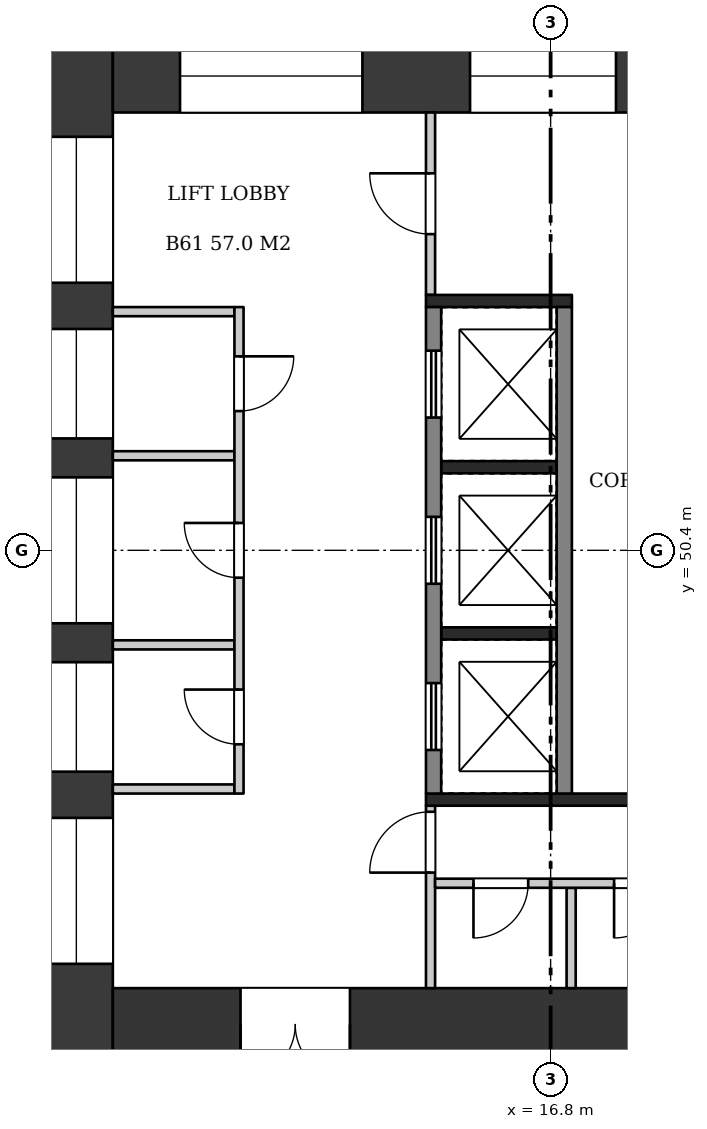
"""IFC4 building model, lengths in metres.
Left out: names, types, materials, properties, quantities, classifications, styles, units other than length and angle.
Written with IfcOpenShell. Run it as: python <this file> out.ifc"""

import sys

from ifc_helpers import new_model, si_unit, direction, frame, frame_2d, origin, place, context, subcontext, project, spatial, rectangle, extrude, element, fill, save


model = new_model("IFC4")
c1 = context("Model", 3, precision=1e-05, world=origin(), true_north=direction((0.0, 1.0)))
c2 = subcontext(c1, "Body", "Model", "MODEL_VIEW")
j1 = project(units=[si_unit("LENGTHUNIT", "METRE"), si_unit("PLANEANGLEUNIT", "RADIAN")], contexts=[c1])
p1 = place(None, origin())
s1 = spatial("IfcSite", under=j1, at=p1, CompositionType="ELEMENT")
p2 = place(p1, origin())
s2 = spatial("IfcBuilding", under=s1, at=p2, CompositionType="ELEMENT")
p3 = place(p2, frame((0.0, 0.0, 235.2)))
s3 = spatial("IfcBuildingStorey", under=s2, at=p3, CompositionType="ELEMENT", Elevation=235.2)
p4 = place(p3, frame((9.0, 58.8, 0.0), z_axis=(0.0, 0.0, 1.0), x_axis=(0.0, -1.0, 0.0)))
e1 = element("IfcWall", 1, at=p4, inside=s3, PredefinedType="SHEAR", context=c2, shape_type="SweptSolid", body=[
    extrude(rectangle(XDim=16.8, YDim=1.2, at=frame_2d((8.4, 0.0))), origin(), (0.0, 0.0, 1.0), 3.22),
])
p5 = place(p4, frame((1.6, 0.0, 0.6)))
e2 = element("IfcOpeningElement", 2, at=p5, cuts=e1, PredefinedType="OPENING", context=c2, shape_type="SweptSolid", body=[
    extrude(rectangle(XDim=2.4, YDim=2.1, at=frame_2d((1.2, 1.05))), frame((0.0, 0.61, 0.0), z_axis=(0.0, -1.0, 0.0), x_axis=(1.0, 0.0, 0.0)), (0.0, 0.0, 1.0), 1.22),
])
p6 = place(p4, frame((4.76, 0.0, 1.6)))
e3 = element("IfcOpeningElement", 3, at=p6, cuts=e1, PredefinedType="OPENING", context=c2, shape_type="SweptSolid", body=[
    extrude(rectangle(XDim=1.8, YDim=1.2, at=frame_2d((0.9, 0.6))), frame((0.0, 0.61, 0.0), z_axis=(0.0, -1.0, 0.0), x_axis=(1.0, 0.0, 0.0)), (0.0, 0.0, 1.0), 1.22),
])
p7 = place(p4, frame((7.2, 0.0, 1.6)))
e4 = element("IfcOpeningElement", 4, at=p7, cuts=e1, PredefinedType="OPENING", context=c2, shape_type="SweptSolid", body=[
    extrude(rectangle(XDim=2.4, YDim=1.2, at=frame_2d((1.2, 0.6))), frame((0.0, 0.61, 0.0), z_axis=(0.0, -1.0, 0.0), x_axis=(1.0, 0.0, 0.0)), (0.0, 0.0, 1.0), 1.22),
])
p8 = place(p4, frame((10.24, 0.0, 1.6)))
e5 = element("IfcOpeningElement", 5, at=p8, cuts=e1, PredefinedType="OPENING", context=c2, shape_type="SweptSolid", body=[
    extrude(rectangle(XDim=1.8, YDim=1.2, at=frame_2d((0.9, 0.6))), frame((0.0, 0.61, 0.0), z_axis=(0.0, -1.0, 0.0), x_axis=(1.0, 0.0, 0.0)), (0.0, 0.0, 1.0), 1.22),
])
p9 = place(p4, frame((12.8, 0.0, 0.6)))
e6 = element("IfcOpeningElement", 6, at=p9, cuts=e1, PredefinedType="OPENING", context=c2, shape_type="SweptSolid", body=[
    extrude(rectangle(XDim=2.4, YDim=2.1, at=frame_2d((1.2, 1.05))), frame((0.0, 0.61, 0.0), z_axis=(0.0, -1.0, 0.0), x_axis=(1.0, 0.0, 0.0)), (0.0, 0.0, 1.0), 1.22),
])
p10 = place(p3, frame((9.6, 58.2, 0.0), z_axis=(0.0, 0.0, 1.0), x_axis=(1.0, 0.0, 0.0)))
e7 = element("IfcWall", 7, at=p10, inside=s3, PredefinedType="SHEAR", context=c2, shape_type="SweptSolid", body=[
    extrude(rectangle(XDim=14.4, YDim=1.2, at=frame_2d((7.2, 0.0))), origin(), (0.0, 0.0, 1.0), 3.22),
])
p11 = place(p10, frame((1.105, 0.0, 0.6)))
e8 = element("IfcOpeningElement", 8, at=p11, cuts=e7, PredefinedType="OPENING", context=c2, shape_type="SweptSolid", body=[
    extrude(rectangle(XDim=3.0, YDim=2.1, at=frame_2d((1.5, 1.05))), frame((0.0, 0.61, 0.0), z_axis=(0.0, -1.0, 0.0), x_axis=(1.0, 0.0, 0.0)), (0.0, 0.0, 1.0), 1.22),
])
p12 = place(p10, frame((5.875, 0.0, 0.6)))
e9 = element("IfcOpeningElement", 9, at=p12, cuts=e7, PredefinedType="OPENING", context=c2, shape_type="SweptSolid", body=[
    extrude(rectangle(XDim=2.4, YDim=2.1, at=frame_2d((1.2, 1.05))), frame((0.0, 0.61, 0.0), z_axis=(0.0, -1.0, 0.0), x_axis=(1.0, 0.0, 0.0)), (0.0, 0.0, 1.0), 1.22),
])
p13 = place(p10, frame((9.993, 0.0, 0.5)))
e10 = element("IfcOpeningElement", 10, at=p13, cuts=e7, PredefinedType="OPENING", context=c2, shape_type="SweptSolid", body=[
    extrude(rectangle(XDim=1.2, YDim=2.4, at=frame_2d((0.6, 1.2))), frame((0.0, 0.61, 0.0), z_axis=(0.0, -1.0, 0.0), x_axis=(1.0, 0.0, 0.0)), (0.0, 0.0, 1.0), 1.22),
])
p14 = place(p10, frame((12.197, 0.0, 0.5)))
e11 = element("IfcOpeningElement", 11, at=p14, cuts=e7, PredefinedType="OPENING", context=c2, shape_type="SweptSolid", body=[
    extrude(rectangle(XDim=1.2, YDim=2.4, at=frame_2d((0.6, 1.2))), frame((0.0, 0.61, 0.0), z_axis=(0.0, -1.0, 0.0), x_axis=(1.0, 0.0, 0.0)), (0.0, 0.0, 1.0), 1.22),
])
p15 = place(p3, frame((9.6, 42.6, 0.0), z_axis=(0.0, 0.0, 1.0), x_axis=(1.0, 0.0, 0.0)))
e12 = element("IfcWall", 12, at=p15, inside=s3, PredefinedType="SHEAR", context=c2, shape_type="SweptSolid", body=[
    extrude(rectangle(XDim=14.4, YDim=1.2, at=frame_2d((7.2, 0.0))), origin(), (0.0, 0.0, 1.0), 3.22),
])
p16 = place(p15, frame((2.1, 0.0, 0.0)))
e13 = element("IfcOpeningElement", 13, at=p16, cuts=e12, PredefinedType="OPENING", context=c2, shape_type="SweptSolid", body=[
    extrude(rectangle(XDim=1.8, YDim=2.1, at=frame_2d((0.9, 1.05))), frame((0.0, 0.61, 0.0), z_axis=(0.0, -1.0, 0.0), x_axis=(1.0, 0.0, 0.0)), (0.0, 0.0, 1.0), 1.22),
])
for number, where, z_axis, x_axis in (
    (14, (9.6, 54.325, 0.0), (0.0, 0.0, 1.0), (1.0, 0.0, 0.0)),
    (15, (9.6, 46.475, 0.0), (0.0, 0.0, 1.0), (1.0, 0.0, 0.0)),
    (16, (9.6, 51.955, 0.0), (0.0, 0.0, 1.0), (1.0, 0.0, 0.0)),
    (17, (9.6, 48.845, 0.0), (0.0, 0.0, 1.0), (1.0, 0.0, 0.0)),
):
    element("IfcWall", number, at=place(p3, frame(where, z_axis=z_axis, x_axis=x_axis)), inside=s3, PredefinedType="PARTITIONING", context=c2, shape_type="SweptSolid", body=[
        extrude(rectangle(XDim=2.0, YDim=0.15, at=frame_2d((1.0, 0.0))), origin(), (0.0, 0.0, 1.0), 3.22),
    ])
p17 = place(p3, frame((11.675, 54.4, 0.0), z_axis=(0.0, 0.0, 1.0), x_axis=(0.0, -1.0, 0.0)))
e18 = element("IfcWall", 18, at=p17, inside=s3, PredefinedType="PARTITIONING", context=c2, shape_type="SweptSolid", body=[
    extrude(rectangle(XDim=8.0, YDim=0.15, at=frame_2d((4.0, 0.0))), origin(), (0.0, 0.0, 1.0), 3.22),
])
p18 = place(p17, frame((0.81, 0.0, 0.0)))
e19 = element("IfcOpeningElement", 19, at=p18, cuts=e18, PredefinedType="OPENING", context=c2, shape_type="SweptSolid", body=[
    extrude(rectangle(XDim=0.9, YDim=2.1, at=frame_2d((0.45, 1.05))), frame((0.0, 0.085, 0.0), z_axis=(0.0, -1.0, 0.0), x_axis=(1.0, 0.0, 0.0)), (0.0, 0.0, 1.0), 0.17),
])
p19 = place(p17, frame((3.55, 0.0, 0.0)))
e20 = element("IfcOpeningElement", 20, at=p19, cuts=e18, PredefinedType="OPENING", context=c2, shape_type="SweptSolid", body=[
    extrude(rectangle(XDim=0.9, YDim=2.1, at=frame_2d((0.45, 1.05))), frame((0.0, 0.085, 0.0), z_axis=(0.0, -1.0, 0.0), x_axis=(1.0, 0.0, 0.0)), (0.0, 0.0, 1.0), 0.17),
])
p20 = place(p17, frame((6.29, 0.0, 0.0)))
e21 = element("IfcOpeningElement", 21, at=p20, cuts=e18, PredefinedType="OPENING", context=c2, shape_type="SweptSolid", body=[
    extrude(rectangle(XDim=0.9, YDim=2.1, at=frame_2d((0.45, 1.05))), frame((0.0, 0.085, 0.0), z_axis=(0.0, -1.0, 0.0), x_axis=(1.0, 0.0, 0.0)), (0.0, 0.0, 1.0), 0.17),
])
for number, where, z_axis, x_axis in (
    (22, (15.0, 51.767, 0.0), (0.0, 0.0, 1.0), (1.0, 0.0, 0.0)),
    (23, (15.0, 49.033, 0.0), (0.0, 0.0, 1.0), (1.0, 0.0, 0.0)),
):
    element("IfcWall", number, at=place(p3, frame(where, z_axis=z_axis, x_axis=x_axis)), inside=s3, PredefinedType="SHEAR", context=c2, shape_type="SweptSolid", body=[
        extrude(rectangle(XDim=1.9, YDim=0.2, at=frame_2d((0.95, 0.0))), origin(), (0.0, 0.0, 1.0), 3.22),
    ])
p21 = place(p3, frame((14.875, 54.4, 0.0), z_axis=(0.0, 0.0, 1.0), x_axis=(0.0, -1.0, 0.0)))
e24 = element("IfcWall", 24, at=p21, inside=s3, PredefinedType="SHEAR", context=c2, shape_type="SweptSolid", body=[
    extrude(rectangle(XDim=8.0, YDim=0.25, at=frame_2d((4.0, 0.0))), origin(), (0.0, 0.0, 1.0), 3.22),
])
p22 = place(p21, frame((0.717, 0.0, 0.0)))
e25 = element("IfcOpeningElement", 25, at=p22, cuts=e24, PredefinedType="OPENING", context=c2, shape_type="SweptSolid", body=[
    extrude(rectangle(XDim=1.1, YDim=2.1, at=frame_2d((0.55, 1.05))), frame((0.0, 0.135, 0.0), z_axis=(0.0, -1.0, 0.0), x_axis=(1.0, 0.0, 0.0)), (0.0, 0.0, 1.0), 0.27),
])
p23 = place(p21, frame((3.45, 0.0, 0.0)))
e26 = element("IfcOpeningElement", 26, at=p23, cuts=e24, PredefinedType="OPENING", context=c2, shape_type="SweptSolid", body=[
    extrude(rectangle(XDim=1.1, YDim=2.1, at=frame_2d((0.55, 1.05))), frame((0.0, 0.135, 0.0), z_axis=(0.0, -1.0, 0.0), x_axis=(1.0, 0.0, 0.0)), (0.0, 0.0, 1.0), 0.27),
])
p24 = place(p21, frame((6.183, 0.0, 0.0)))
e27 = element("IfcOpeningElement", 27, at=p24, cuts=e24, PredefinedType="OPENING", context=c2, shape_type="SweptSolid", body=[
    extrude(rectangle(XDim=1.1, YDim=2.1, at=frame_2d((0.55, 1.05))), frame((0.0, 0.135, 0.0), z_axis=(0.0, -1.0, 0.0), x_axis=(1.0, 0.0, 0.0)), (0.0, 0.0, 1.0), 0.27),
])
p25 = place(p3, frame((17.025, 54.4, 0.0), z_axis=(0.0, 0.0, 1.0), x_axis=(0.0, -1.0, 0.0)))
e28 = element("IfcWall", 28, at=p25, inside=s3, PredefinedType="SHEAR", context=c2, shape_type="SweptSolid", body=[
    extrude(rectangle(XDim=8.0, YDim=0.25, at=frame_2d((4.0, 0.0))), origin(), (0.0, 0.0, 1.0), 3.22),
])
p26 = place(p3, frame((14.75, 54.5, 0.0), z_axis=(0.0, 0.0, 1.0), x_axis=(1.0, 0.0, 0.0)))
e29 = element("IfcWall", 29, at=p26, inside=s3, PredefinedType="SHEAR", context=c2, shape_type="SweptSolid", body=[
    extrude(rectangle(XDim=2.4, YDim=0.2, at=frame_2d((1.2, 0.0))), origin(), (0.0, 0.0, 1.0), 3.22),
])
p27 = place(p3, frame((14.825, 57.6, 0.0), z_axis=(0.0, 0.0, 1.0), x_axis=(0.0, -1.0, 0.0)))
e30 = element("IfcWall", 30, at=p27, inside=s3, PredefinedType="PARTITIONING", context=c2, shape_type="SweptSolid", body=[
    extrude(rectangle(XDim=3.0, YDim=0.15, at=frame_2d((1.5, 0.0))), origin(), (0.0, 0.0, 1.0), 3.22),
])
p28 = place(p27, frame((1.0, 0.0, 0.0)))
e31 = element("IfcOpeningElement", 31, at=p28, cuts=e30, PredefinedType="OPENING", context=c2, shape_type="SweptSolid", body=[
    extrude(rectangle(XDim=1.0, YDim=2.1, at=frame_2d((0.5, 1.05))), frame((0.0, 0.085, 0.0), z_axis=(0.0, -1.0, 0.0), x_axis=(1.0, 0.0, 0.0)), (0.0, 0.0, 1.0), 0.17),
])
p29 = place(p3, frame((14.75, 46.3, 0.0), z_axis=(0.0, 0.0, 1.0), x_axis=(1.0, 0.0, 0.0)))
e32 = element("IfcWall", 32, at=p29, inside=s3, PredefinedType="SHEAR", context=c2, shape_type="SweptSolid", body=[
    extrude(rectangle(XDim=9.25, YDim=0.2, at=frame_2d((4.625, 0.0))), origin(), (0.0, 0.0, 1.0), 3.22),
])
p30 = place(p3, frame((14.825, 46.2, 0.0), z_axis=(0.0, 0.0, 1.0), x_axis=(0.0, -1.0, 0.0)))
e33 = element("IfcWall", 33, at=p30, inside=s3, PredefinedType="PARTITIONING", context=c2, shape_type="SweptSolid", body=[
    extrude(rectangle(XDim=3.0, YDim=0.15, at=frame_2d((1.5, 0.0))), origin(), (0.0, 0.0, 1.0), 3.22),
])
p31 = place(p30, frame((0.1, 0.0, 0.0)))
e34 = element("IfcOpeningElement", 34, at=p31, cuts=e33, PredefinedType="OPENING", context=c2, shape_type="SweptSolid", body=[
    extrude(rectangle(XDim=1.0, YDim=2.1, at=frame_2d((0.5, 1.05))), frame((0.0, 0.085, 0.0), z_axis=(0.0, -1.0, 0.0), x_axis=(1.0, 0.0, 0.0)), (0.0, 0.0, 1.0), 0.17),
])
p32 = place(p3, frame((17.137, 44.85, 0.0), z_axis=(0.0, 0.0, 1.0), x_axis=(0.0, -1.0, 0.0)))
e35 = element("IfcWall", 35, at=p32, inside=s3, PredefinedType="PARTITIONING", context=c2, shape_type="SweptSolid", body=[
    extrude(rectangle(XDim=1.65, YDim=0.15, at=frame_2d((0.825, 0.0))), origin(), (0.0, 0.0, 1.0), 3.22),
])
p33 = place(p3, frame((14.9, 44.925, 0.0), z_axis=(0.0, 0.0, 1.0), x_axis=(1.0, 0.0, 0.0)))
e36 = element("IfcWall", 36, at=p33, inside=s3, PredefinedType="PARTITIONING", context=c2, shape_type="SweptSolid", body=[
    extrude(rectangle(XDim=9.1, YDim=0.15, at=frame_2d((4.55, 0.0))), origin(), (0.0, 0.0, 1.0), 3.22),
])
p34 = place(p33, frame((0.631, 0.0, 0.0)))
e37 = element("IfcOpeningElement", 37, at=p34, cuts=e36, PredefinedType="OPENING", context=c2, shape_type="SweptSolid", body=[
    extrude(rectangle(XDim=0.9, YDim=2.1, at=frame_2d((0.45, 1.05))), frame((0.0, 0.085, 0.0), z_axis=(0.0, -1.0, 0.0), x_axis=(1.0, 0.0, 0.0)), (0.0, 0.0, 1.0), 0.17),
])
p35 = place(p33, frame((2.944, 0.0, 0.0)))
e38 = element("IfcOpeningElement", 38, at=p35, cuts=e36, PredefinedType="OPENING", context=c2, shape_type="SweptSolid", body=[
    extrude(rectangle(XDim=0.9, YDim=2.1, at=frame_2d((0.45, 1.05))), frame((0.0, 0.085, 0.0), z_axis=(0.0, -1.0, 0.0), x_axis=(1.0, 0.0, 0.0)), (0.0, 0.0, 1.0), 0.17),
])
p36 = place(p33, frame((5.256, 0.0, 0.0)))
e39 = element("IfcOpeningElement", 39, at=p36, cuts=e36, PredefinedType="OPENING", context=c2, shape_type="SweptSolid", body=[
    extrude(rectangle(XDim=0.9, YDim=2.1, at=frame_2d((0.45, 1.05))), frame((0.0, 0.085, 0.0), z_axis=(0.0, -1.0, 0.0), x_axis=(1.0, 0.0, 0.0)), (0.0, 0.0, 1.0), 0.17),
])
p37 = place(p33, frame((7.569, 0.0, 0.0)))
e40 = element("IfcOpeningElement", 40, at=p37, cuts=e36, PredefinedType="OPENING", context=c2, shape_type="SweptSolid", body=[
    extrude(rectangle(XDim=0.9, YDim=2.1, at=frame_2d((0.45, 1.05))), frame((0.0, 0.085, 0.0), z_axis=(0.0, -1.0, 0.0), x_axis=(1.0, 0.0, 0.0)), (0.0, 0.0, 1.0), 0.17),
])
p38 = place(p16, frame((1.8, 0.0, 0.0), z_axis=(0.0, 0.0, 1.0), x_axis=(-1.0, 0.0, 0.0)))
e41 = element("IfcDoor", 41, at=p38, inside=s3, OperationType="DOUBLE_DOOR_SINGLE_SWING", PredefinedType="DOOR", context=c2, shape_type="SweptSolid", body=[
    extrude(rectangle(XDim=1.8, YDim=2.1, at=frame_2d((0.9, 1.05))), frame((0.0, 0.025, 0.0), z_axis=(0.0, -1.0, 0.0), x_axis=(1.0, 0.0, 0.0)), (0.0, 0.0, 1.0), 0.05),
])
fill(e13, e41)
p39 = place(p18, origin())
e42 = element("IfcDoor", 42, at=p39, inside=s3, OperationType="SINGLE_SWING_LEFT", PredefinedType="DOOR", context=c2, shape_type="SweptSolid", body=[
    extrude(rectangle(XDim=0.9, YDim=2.1, at=frame_2d((0.45, 1.05))), frame((0.0, 0.025, 0.0), z_axis=(0.0, -1.0, 0.0), x_axis=(1.0, 0.0, 0.0)), (0.0, 0.0, 1.0), 0.05),
])
fill(e19, e42)
p40 = place(p19, frame((0.9, 0.0, 0.0), z_axis=(0.0, 0.0, 1.0), x_axis=(-1.0, 0.0, 0.0)))
e43 = element("IfcDoor", 43, at=p40, inside=s3, OperationType="SINGLE_SWING_RIGHT", PredefinedType="DOOR", context=c2, shape_type="SweptSolid", body=[
    extrude(rectangle(XDim=0.9, YDim=2.1, at=frame_2d((0.45, 1.05))), frame((0.0, 0.025, 0.0), z_axis=(0.0, -1.0, 0.0), x_axis=(1.0, 0.0, 0.0)), (0.0, 0.0, 1.0), 0.05),
])
fill(e20, e43)
p41 = place(p20, frame((0.9, 0.0, 0.0), z_axis=(0.0, 0.0, 1.0), x_axis=(-1.0, 0.0, 0.0)))
e44 = element("IfcDoor", 44, at=p41, inside=s3, OperationType="SINGLE_SWING_RIGHT", PredefinedType="DOOR", context=c2, shape_type="SweptSolid", body=[
    extrude(rectangle(XDim=0.9, YDim=2.1, at=frame_2d((0.45, 1.05))), frame((0.0, 0.025, 0.0), z_axis=(0.0, -1.0, 0.0), x_axis=(1.0, 0.0, 0.0)), (0.0, 0.0, 1.0), 0.05),
])
fill(e21, e44)
p42 = place(p22, origin())
e45 = element("IfcDoor", 45, at=p42, inside=s3, OperationType="DOUBLE_DOOR_SLIDING", PredefinedType="DOOR", context=c2, shape_type="SweptSolid", body=[
    extrude(rectangle(XDim=1.1, YDim=2.1, at=frame_2d((0.55, 1.05))), frame((0.0, 0.025, 0.0), z_axis=(0.0, -1.0, 0.0), x_axis=(1.0, 0.0, 0.0)), (0.0, 0.0, 1.0), 0.05),
])
fill(e25, e45)
p43 = place(p23, origin())
e46 = element("IfcDoor", 46, at=p43, inside=s3, OperationType="DOUBLE_DOOR_SLIDING", PredefinedType="DOOR", context=c2, shape_type="SweptSolid", body=[
    extrude(rectangle(XDim=1.1, YDim=2.1, at=frame_2d((0.55, 1.05))), frame((0.0, 0.025, 0.0), z_axis=(0.0, -1.0, 0.0), x_axis=(1.0, 0.0, 0.0)), (0.0, 0.0, 1.0), 0.05),
])
fill(e26, e46)
p44 = place(p24, origin())
e47 = element("IfcDoor", 47, at=p44, inside=s3, OperationType="DOUBLE_DOOR_SLIDING", PredefinedType="DOOR", context=c2, shape_type="SweptSolid", body=[
    extrude(rectangle(XDim=1.1, YDim=2.1, at=frame_2d((0.55, 1.05))), frame((0.0, 0.025, 0.0), z_axis=(0.0, -1.0, 0.0), x_axis=(1.0, 0.0, 0.0)), (0.0, 0.0, 1.0), 0.05),
])
fill(e27, e47)
p45 = place(p28, frame((1.0, 0.0, 0.0), z_axis=(0.0, 0.0, 1.0), x_axis=(-1.0, 0.0, 0.0)))
e48 = element("IfcDoor", 48, at=p45, inside=s3, OperationType="SINGLE_SWING_RIGHT", PredefinedType="DOOR", context=c2, shape_type="SweptSolid", body=[
    extrude(rectangle(XDim=1.0, YDim=2.1, at=frame_2d((0.5, 1.05))), frame((0.0, 0.025, 0.0), z_axis=(0.0, -1.0, 0.0), x_axis=(1.0, 0.0, 0.0)), (0.0, 0.0, 1.0), 0.05),
])
fill(e31, e48)
p46 = place(p31, frame((1.0, 0.0, 0.0), z_axis=(0.0, 0.0, 1.0), x_axis=(-1.0, 0.0, 0.0)))
e49 = element("IfcDoor", 49, at=p46, inside=s3, OperationType="SINGLE_SWING_LEFT", PredefinedType="DOOR", context=c2, shape_type="SweptSolid", body=[
    extrude(rectangle(XDim=1.0, YDim=2.1, at=frame_2d((0.5, 1.05))), frame((0.0, 0.025, 0.0), z_axis=(0.0, -1.0, 0.0), x_axis=(1.0, 0.0, 0.0)), (0.0, 0.0, 1.0), 0.05),
])
fill(e34, e49)
p47 = place(p34, frame((0.9, 0.0, 0.0), z_axis=(0.0, 0.0, 1.0), x_axis=(-1.0, 0.0, 0.0)))
e50 = element("IfcDoor", 50, at=p47, inside=s3, OperationType="SINGLE_SWING_RIGHT", PredefinedType="DOOR", context=c2, shape_type="SweptSolid", body=[
    extrude(rectangle(XDim=0.9, YDim=2.1, at=frame_2d((0.45, 1.05))), frame((0.0, 0.025, 0.0), z_axis=(0.0, -1.0, 0.0), x_axis=(1.0, 0.0, 0.0)), (0.0, 0.0, 1.0), 0.05),
])
fill(e37, e50)
p48 = place(p35, frame((0.9, 0.0, 0.0), z_axis=(0.0, 0.0, 1.0), x_axis=(-1.0, 0.0, 0.0)))
e51 = element("IfcDoor", 51, at=p48, inside=s3, OperationType="SINGLE_SWING_RIGHT", PredefinedType="DOOR", context=c2, shape_type="SweptSolid", body=[
    extrude(rectangle(XDim=0.9, YDim=2.1, at=frame_2d((0.45, 1.05))), frame((0.0, 0.025, 0.0), z_axis=(0.0, -1.0, 0.0), x_axis=(1.0, 0.0, 0.0)), (0.0, 0.0, 1.0), 0.05),
])
fill(e38, e51)
p49 = place(p5, origin())
e52 = element("IfcWindow", 52, at=p49, inside=s3, PartitioningType="SINGLE_PANEL", PredefinedType="WINDOW", context=c2, shape_type="SweptSolid", body=[
    extrude(rectangle(XDim=2.4, YDim=2.1, at=frame_2d((1.2, 1.05))), frame((0.0, 0.03, 0.0), z_axis=(0.0, -1.0, 0.0), x_axis=(1.0, 0.0, 0.0)), (0.0, 0.0, 1.0), 0.06),
])
fill(e2, e52)
p50 = place(p6, origin())
e53 = element("IfcWindow", 53, at=p50, inside=s3, PartitioningType="SINGLE_PANEL", PredefinedType="WINDOW", context=c2, shape_type="SweptSolid", body=[
    extrude(rectangle(XDim=1.8, YDim=1.2, at=frame_2d((0.9, 0.6))), frame((0.0, 0.03, 0.0), z_axis=(0.0, -1.0, 0.0), x_axis=(1.0, 0.0, 0.0)), (0.0, 0.0, 1.0), 0.06),
])
fill(e3, e53)
p51 = place(p7, origin())
e54 = element("IfcWindow", 54, at=p51, inside=s3, PartitioningType="SINGLE_PANEL", PredefinedType="WINDOW", context=c2, shape_type="SweptSolid", body=[
    extrude(rectangle(XDim=2.4, YDim=1.2, at=frame_2d((1.2, 0.6))), frame((0.0, 0.03, 0.0), z_axis=(0.0, -1.0, 0.0), x_axis=(1.0, 0.0, 0.0)), (0.0, 0.0, 1.0), 0.06),
])
fill(e4, e54)
p52 = place(p8, origin())
e55 = element("IfcWindow", 55, at=p52, inside=s3, PartitioningType="SINGLE_PANEL", PredefinedType="WINDOW", context=c2, shape_type="SweptSolid", body=[
    extrude(rectangle(XDim=1.8, YDim=1.2, at=frame_2d((0.9, 0.6))), frame((0.0, 0.03, 0.0), z_axis=(0.0, -1.0, 0.0), x_axis=(1.0, 0.0, 0.0)), (0.0, 0.0, 1.0), 0.06),
])
fill(e5, e55)
p53 = place(p9, origin())
e56 = element("IfcWindow", 56, at=p53, inside=s3, PartitioningType="SINGLE_PANEL", PredefinedType="WINDOW", context=c2, shape_type="SweptSolid", body=[
    extrude(rectangle(XDim=2.4, YDim=2.1, at=frame_2d((1.2, 1.05))), frame((0.0, 0.03, 0.0), z_axis=(0.0, -1.0, 0.0), x_axis=(1.0, 0.0, 0.0)), (0.0, 0.0, 1.0), 0.06),
])
fill(e6, e56)
p54 = place(p11, origin())
e57 = element("IfcWindow", 57, at=p54, inside=s3, PartitioningType="SINGLE_PANEL", PredefinedType="WINDOW", context=c2, shape_type="SweptSolid", body=[
    extrude(rectangle(XDim=3.0, YDim=2.1, at=frame_2d((1.5, 1.05))), frame((0.0, 0.03, 0.0), z_axis=(0.0, -1.0, 0.0), x_axis=(1.0, 0.0, 0.0)), (0.0, 0.0, 1.0), 0.06),
])
fill(e8, e57)
p55 = place(p12, origin())
e58 = element("IfcWindow", 58, at=p55, inside=s3, PartitioningType="SINGLE_PANEL", PredefinedType="WINDOW", context=c2, shape_type="SweptSolid", body=[
    extrude(rectangle(XDim=2.4, YDim=2.1, at=frame_2d((1.2, 1.05))), frame((0.0, 0.03, 0.0), z_axis=(0.0, -1.0, 0.0), x_axis=(1.0, 0.0, 0.0)), (0.0, 0.0, 1.0), 0.06),
])
fill(e9, e58)
save(model, sys.argv[1])
